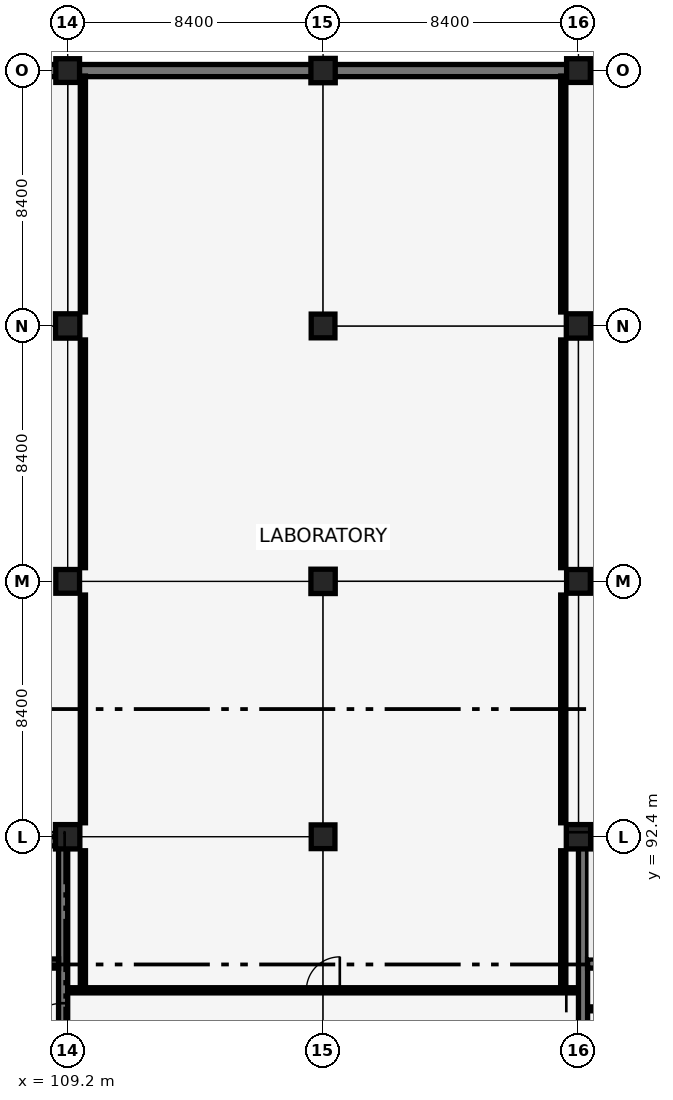
"""IFC4 building model, lengths in metres.
Left out: names, types, materials, properties, quantities, classifications, styles, units other than length and angle.
Written with IfcOpenShell. Run it as: python <this file> out.ifc"""

import sys

from ifc_helpers import new_model, si_unit, direction, frame, frame_2d, origin, origin_2d, place, context, subcontext, project, spatial, rectangle, extrude, element, fill, save


model = new_model("IFC4")
c1 = context("Model", 3, precision=1e-05, world=origin(), true_north=direction((0.0, 1.0)))
c2 = subcontext(c1, "Body", "Model", "MODEL_VIEW")
j1 = project(units=[si_unit("LENGTHUNIT", "METRE"), si_unit("PLANEANGLEUNIT", "RADIAN")], contexts=[c1])
p1 = place(None, origin())
s1 = spatial("IfcSite", under=j1, at=p1, CompositionType="ELEMENT")
p2 = place(p1, origin())
s2 = spatial("IfcBuilding", under=s1, at=p2, CompositionType="ELEMENT")
p3 = place(p2, frame((0.0, 0.0, -4.42)))
s3 = spatial("IfcBuildingStorey", under=s2, at=p3, CompositionType="ELEMENT", Elevation=-4.42)
p4 = place(p3, frame((101.15, 117.6, 0.0), z_axis=(0.0, 0.0, 1.0), x_axis=(1.0, 0.0, 0.0)))
e1 = element("IfcWall", 1, at=p4, inside=s3, PredefinedType="USERDEFINED", context=c2, shape_type="SweptSolid", body=[
    extrude(rectangle(XDim=7.7, YDim=0.4, at=frame_2d((3.85, 0.0))), origin(), (0.0, 0.0, 1.0), 4.12),
])
for number, where, z_axis, x_axis in (
    (2, (109.55, 117.6, 0.0), (0.0, 0.0, 1.0), (1.0, 0.0, 0.0)),
    (3, (117.95, 117.6, 0.0), (0.0, 0.0, 1.0), (1.0, 0.0, 0.0)),
    (4, (126.35, 117.6, 0.0), (0.0, 0.0, 1.0), (1.0, 0.0, 0.0)),
):
    element("IfcWall", number, at=place(p3, frame(where, z_axis=z_axis, x_axis=x_axis)), inside=s3, PredefinedType="USERDEFINED", context=c2, shape_type="SweptSolid", body=[
        extrude(rectangle(XDim=7.7, YDim=0.4, at=frame_2d((3.85, 0.0))), origin(), (0.0, 0.0, 1.0), 4.12),
    ])
for number, where, z_axis, x_axis in (
    (5, (126.15, 92.25, 0.0), (0.0, 0.0, 1.0), (1.0, 0.0, 0.0)),
    (6, (126.15, 84.15, 0.0), (0.0, 0.0, 1.0), (0.0, 1.0, 0.0)),
):
    element("IfcWall", number, at=place(p3, frame(where, z_axis=z_axis, x_axis=x_axis)), inside=s3, PredefinedType="SHEAR", context=c2, shape_type="SweptSolid", body=[
        extrude(rectangle(XDim=8.1, YDim=0.3, at=frame_2d((4.05, 0.0))), origin(), (0.0, 0.0, 1.0), 4.12),
    ])
p5 = place(p3, frame((126.3, 88.23, 0.0), z_axis=(0.0, 0.0, 1.0), x_axis=(1.0, 0.0, 0.0)))
e7 = element("IfcWall", 7, at=p5, inside=s3, PredefinedType="SHEAR", context=c2, shape_type="SweptSolid", body=[
    extrude(rectangle(XDim=7.8, YDim=0.3, at=frame_2d((3.9, 0.0))), origin(), (0.0, 0.0, 1.0), 4.12),
])
p6 = place(p5, frame((6.2, 0.0, 0.0)))
e8 = element("IfcOpeningElement", 8, at=p6, cuts=e7, PredefinedType="OPENING", context=c2, shape_type="SweptSolid", body=[
    extrude(rectangle(XDim=1.35, YDim=2.15, at=frame_2d((0.675, 1.075))), frame((0.0, 0.16, 0.0), z_axis=(0.0, -1.0, 0.0), x_axis=(1.0, 0.0, 0.0)), (0.0, 0.0, 1.0), 0.32),
])
p7 = place(p3, frame((100.95, 92.25, 0.0), z_axis=(0.0, 0.0, 1.0), x_axis=(1.0, 0.0, 0.0)))
e9 = element("IfcWall", 9, at=p7, inside=s3, PredefinedType="SHEAR", context=c2, shape_type="SweptSolid", body=[
    extrude(rectangle(XDim=8.1, YDim=0.3, at=frame_2d((4.05, 0.0))), origin(), (0.0, 0.0, 1.0), 4.12),
])
p8 = place(p3, frame((109.05, 84.15, 0.0), z_axis=(0.0, 0.0, 1.0), x_axis=(0.0, 1.0, 0.0)))
e10 = element("IfcWall", 10, at=p8, inside=s3, PredefinedType="SHEAR", context=c2, shape_type="SweptSolid", body=[
    extrude(rectangle(XDim=8.1, YDim=0.3, at=frame_2d((4.05, 0.0))), origin(), (0.0, 0.0, 1.0), 4.12),
])
p9 = place(p8, frame((1.325, 0.0, 0.0)))
e11 = element("IfcOpeningElement", 11, at=p9, cuts=e10, PredefinedType="OPENING", context=c2, shape_type="SweptSolid", body=[
    extrude(rectangle(XDim=1.45, YDim=2.15, at=frame_2d((0.725, 1.075))), frame((0.0, 0.16, 0.0), z_axis=(0.0, -1.0, 0.0), x_axis=(1.0, 0.0, 0.0)), (0.0, 0.0, 1.0), 0.32),
])
p10 = place(p3, frame((101.1, 88.23, 0.0), z_axis=(0.0, 0.0, 1.0), x_axis=(1.0, 0.0, 0.0)))
e12 = element("IfcWall", 12, at=p10, inside=s3, PredefinedType="SHEAR", context=c2, shape_type="SweptSolid", body=[
    extrude(rectangle(XDim=7.8, YDim=0.3, at=frame_2d((3.9, 0.0))), origin(), (0.0, 0.0, 1.0), 4.12),
])
p11 = place(p10, frame((6.2, 0.0, 0.0)))
e13 = element("IfcOpeningElement", 13, at=p11, cuts=e12, PredefinedType="OPENING", context=c2, shape_type="SweptSolid", body=[
    extrude(rectangle(XDim=1.35, YDim=2.15, at=frame_2d((0.675, 1.075))), frame((0.0, 0.16, 0.0), z_axis=(0.0, -1.0, 0.0), x_axis=(1.0, 0.0, 0.0)), (0.0, 0.0, 1.0), 0.32),
])
p12 = place(p3, frame((109.2, 92.4, -0.4), z_axis=(0.0, 0.0, 1.0), x_axis=(1.0, 0.0, 0.0)))
e14 = element("IfcColumn", 14, at=p12, inside=s3, PredefinedType="COLUMN", context=c2, shape_type="SweptSolid", body=[
    extrude(rectangle(XDim=0.8, YDim=0.8, at=origin_2d()), origin(), (0.0, 0.0, 1.0), 4.52),
])
p13 = place(p3, frame((109.2, 100.8, -0.4), z_axis=(0.0, 0.0, 1.0), x_axis=(1.0, 0.0, 0.0)))
e15 = element("IfcColumn", 15, at=p13, inside=s3, PredefinedType="COLUMN", context=c2, shape_type="SweptSolid", body=[
    extrude(rectangle(XDim=0.78, YDim=0.78, at=origin_2d()), origin(), (0.0, 0.0, 1.0), 4.52),
])
p14 = place(p3, frame((109.2, 109.2, -0.4), z_axis=(0.0, 0.0, 1.0), x_axis=(1.0, 0.0, 0.0)))
e16 = element("IfcColumn", 16, at=p14, inside=s3, PredefinedType="COLUMN", context=c2, shape_type="SweptSolid", body=[
    extrude(rectangle(XDim=0.8, YDim=0.8, at=origin_2d()), origin(), (0.0, 0.0, 1.0), 4.52),
])
for number, where, z_axis, x_axis in (
    (17, (109.2, 117.6, -0.4), (0.0, 0.0, 1.0), (1.0, 0.0, 0.0)),
    (18, (117.6, 92.4, -0.4), (0.0, 0.0, 1.0), (1.0, 0.0, 0.0)),
):
    element("IfcColumn", number, at=place(p3, frame(where, z_axis=z_axis, x_axis=x_axis)), inside=s3, PredefinedType="COLUMN", context=c2, shape_type="SweptSolid", body=[
        extrude(rectangle(XDim=0.78, YDim=0.78, at=origin_2d()), origin(), (0.0, 0.0, 1.0), 4.52),
    ])
p15 = place(p3, frame((117.6, 100.8, -0.4), z_axis=(0.0, 0.0, 1.0), x_axis=(1.0, 0.0, 0.0)))
e19 = element("IfcColumn", 19, at=p15, inside=s3, PredefinedType="COLUMN", context=c2, shape_type="SweptSolid", body=[
    extrude(rectangle(XDim=0.8, YDim=0.8, at=origin_2d()), origin(), (0.0, 0.0, 1.0), 4.52),
])
p16 = place(p3, frame((117.6, 109.2, -0.4), z_axis=(0.0, 0.0, 1.0), x_axis=(1.0, 0.0, 0.0)))
e20 = element("IfcColumn", 20, at=p16, inside=s3, PredefinedType="COLUMN", context=c2, shape_type="SweptSolid", body=[
    extrude(rectangle(XDim=0.78, YDim=0.78, at=origin_2d()), origin(), (0.0, 0.0, 1.0), 4.52),
])
for number, where, z_axis, x_axis in (
    (21, (117.6, 117.6, -0.4), (0.0, 0.0, 1.0), (1.0, 0.0, 0.0)),
    (22, (126.0, 92.4, -0.4), (0.0, 0.0, 1.0), (1.0, 0.0, 0.0)),
):
    element("IfcColumn", number, at=place(p3, frame(where, z_axis=z_axis, x_axis=x_axis)), inside=s3, PredefinedType="COLUMN", context=c2, shape_type="SweptSolid", body=[
        extrude(rectangle(XDim=0.8, YDim=0.8, at=origin_2d()), origin(), (0.0, 0.0, 1.0), 4.52),
    ])
p17 = place(p3, frame((126.0, 100.8, -0.4), z_axis=(0.0, 0.0, 1.0), x_axis=(1.0, 0.0, 0.0)))
e23 = element("IfcColumn", 23, at=p17, inside=s3, PredefinedType="COLUMN", context=c2, shape_type="SweptSolid", body=[
    extrude(rectangle(XDim=0.78, YDim=0.78, at=origin_2d()), origin(), (0.0, 0.0, 1.0), 4.52),
])
p18 = place(p3, frame((126.0, 109.2, -0.4), z_axis=(0.0, 0.0, 1.0), x_axis=(1.0, 0.0, 0.0)))
e24 = element("IfcColumn", 24, at=p18, inside=s3, PredefinedType="COLUMN", context=c2, shape_type="SweptSolid", body=[
    extrude(rectangle(XDim=0.8, YDim=0.8, at=origin_2d()), origin(), (0.0, 0.0, 1.0), 4.52),
])
p19 = place(p3, frame((126.0, 117.6, -0.4), z_axis=(0.0, 0.0, 1.0), x_axis=(1.0, 0.0, 0.0)))
e25 = element("IfcColumn", 25, at=p19, inside=s3, PredefinedType="COLUMN", context=c2, shape_type="SweptSolid", body=[
    extrude(rectangle(XDim=0.78, YDim=0.78, at=origin_2d()), origin(), (0.0, 0.0, 1.0), 4.52),
])
p20 = place(p3, frame((126.32, 86.74, 0.0), z_axis=(0.0, 0.0, 1.0), x_axis=(1.0, 0.0, 0.0)))
e26 = element("IfcWall", 26, at=p20, inside=s3, PredefinedType="PARTITIONING", context=c2, shape_type="SweptSolid", body=[
    extrude(rectangle(XDim=1.62, YDim=0.13, at=frame_2d((0.81, 0.0))), origin(), (0.0, 0.0, 1.0), 4.12),
])
p21 = place(p3, frame((109.23, 87.35, 0.0), z_axis=(0.0, 0.0, 1.0), x_axis=(1.0, 0.0, 0.0)))
e27 = element("IfcWall", 27, at=p21, inside=s3, PredefinedType="PARTITIONING", context=c2, shape_type="SweptSolid", body=[
    extrude(rectangle(XDim=16.74, YDim=0.17, at=frame_2d((8.37, 0.0))), origin(), (0.0, 0.0, 1.0), 3.32),
])
p22 = place(p21, frame((7.82, 0.0, 0.0)))
e28 = element("IfcOpeningElement", 28, at=p22, cuts=e27, PredefinedType="OPENING", context=c2, shape_type="SweptSolid", body=[
    extrude(rectangle(XDim=1.1, YDim=2.15, at=frame_2d((0.55, 1.075))), frame((0.0, 0.095, 0.0), z_axis=(0.0, -1.0, 0.0), x_axis=(1.0, 0.0, 0.0)), (0.0, 0.0, 1.0), 0.19),
])
p23 = place(p3, frame((109.7, 87.5, 0.0), z_axis=(0.0, 0.0, 1.0), x_axis=(0.0, 1.0, 0.0)))
e29 = element("IfcWall", 29, at=p23, inside=s3, PredefinedType="PARTITIONING", context=c2, shape_type="SweptSolid", body=[
    extrude(rectangle(XDim=4.44, YDim=0.17, at=frame_2d((2.22, 0.0))), origin(), (0.0, 0.0, 1.0), 3.56),
])
p24 = place(p3, frame((109.7, 92.86, 0.0), z_axis=(0.0, 0.0, 1.0), x_axis=(0.0, 1.0, 0.0)))
e30 = element("IfcWall", 30, at=p24, inside=s3, PredefinedType="PARTITIONING", context=c2, shape_type="SweptSolid", body=[
    extrude(rectangle(XDim=7.49, YDim=0.17, at=frame_2d((3.745, 0.0))), origin(), (0.0, 0.0, 1.0), 3.57),
])
p25 = place(p3, frame((109.7, 101.25, 0.0), z_axis=(0.0, 0.0, 1.0), x_axis=(0.0, 1.0, 0.0)))
e31 = element("IfcWall", 31, at=p25, inside=s3, PredefinedType="PARTITIONING", context=c2, shape_type="SweptSolid", body=[
    extrude(rectangle(XDim=7.49, YDim=0.17, at=frame_2d((3.745, 0.0))), origin(), (0.0, 0.0, 1.0), 3.56),
])
p26 = place(p3, frame((109.7, 109.66, 0.0), z_axis=(0.0, 0.0, 1.0), x_axis=(0.0, 1.0, 0.0)))
e32 = element("IfcWall", 32, at=p26, inside=s3, PredefinedType="PARTITIONING", context=c2, shape_type="SweptSolid", body=[
    extrude(rectangle(XDim=7.76, YDim=0.17, at=frame_2d((3.88, 0.0))), origin(), (0.0, 0.0, 1.0), 3.38),
])
p27 = place(p3, frame((125.5, 87.5, 0.0), z_axis=(0.0, 0.0, 1.0), x_axis=(0.0, 1.0, 0.0)))
e33 = element("IfcWall", 33, at=p27, inside=s3, PredefinedType="PARTITIONING", context=c2, shape_type="SweptSolid", body=[
    extrude(rectangle(XDim=4.44, YDim=0.17, at=frame_2d((2.22, 0.0))), origin(), (0.0, 0.0, 1.0), 3.57),
])
p28 = place(p3, frame((125.5, 92.86, 0.0), z_axis=(0.0, 0.0, 1.0), x_axis=(0.0, 1.0, 0.0)))
e34 = element("IfcWall", 34, at=p28, inside=s3, PredefinedType="PARTITIONING", context=c2, shape_type="SweptSolid", body=[
    extrude(rectangle(XDim=7.49, YDim=0.17, at=frame_2d((3.745, 0.0))), origin(), (0.0, 0.0, 1.0), 3.56),
])
p29 = place(p3, frame((125.5, 101.25, 0.0), z_axis=(0.0, 0.0, 1.0), x_axis=(0.0, 1.0, 0.0)))
e35 = element("IfcWall", 35, at=p29, inside=s3, PredefinedType="PARTITIONING", context=c2, shape_type="SweptSolid", body=[
    extrude(rectangle(XDim=7.49, YDim=0.17, at=frame_2d((3.745, 0.0))), origin(), (0.0, 0.0, 1.0), 3.57),
])
p30 = place(p3, frame((125.5, 109.66, 0.0), z_axis=(0.0, 0.0, 1.0), x_axis=(0.0, 1.0, 0.0)))
e36 = element("IfcWall", 36, at=p30, inside=s3, PredefinedType="PARTITIONING", context=c2, shape_type="SweptSolid", body=[
    extrude(rectangle(XDim=7.76, YDim=0.17, at=frame_2d((3.88, 0.0))), origin(), (0.0, 0.0, 1.0), 3.38),
])
p31 = place(p9, origin())
e37 = element("IfcDoor", 37, at=p31, inside=s3, OperationType="DOUBLE_DOOR_SINGLE_SWING", PredefinedType="DOOR", context=c2, shape_type="SweptSolid", body=[
    extrude(rectangle(XDim=1.45, YDim=2.15, at=frame_2d((0.725, 1.075))), frame((0.0, 0.025, 0.0), z_axis=(0.0, -1.0, 0.0), x_axis=(1.0, 0.0, 0.0)), (0.0, 0.0, 1.0), 0.05),
])
fill(e11, e37)
p32 = place(p22, origin())
e38 = element("IfcDoor", 38, at=p32, inside=s3, OperationType="SINGLE_SWING_RIGHT", PredefinedType="DOOR", context=c2, shape_type="SweptSolid", body=[
    extrude(rectangle(XDim=1.1, YDim=2.15, at=frame_2d((0.55, 1.075))), frame((0.0, 0.025, 0.0), z_axis=(0.0, -1.0, 0.0), x_axis=(1.0, 0.0, 0.0)), (0.0, 0.0, 1.0), 0.05),
])
fill(e28, e38)
save(model, sys.argv[1])
